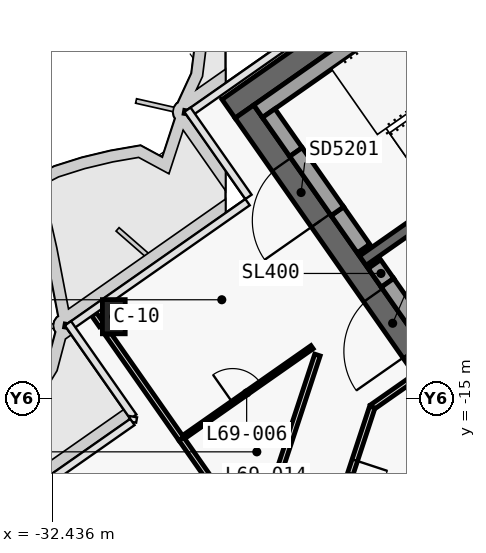
"""IFC4 building model, lengths in metres.
Left out: names, types, materials, properties, quantities, classifications, styles, units other than length and angle.
Written with IfcOpenShell. Run it as: python <this file> out.ifc"""

import sys

from ifc_helpers import new_model, si_unit, direction, frame, frame_2d, origin, origin_2d, place, context, subcontext, project, spatial, polyline, rectangle, outline, extrude, clip, halfspace, element, fill, save


model = new_model("IFC4")
c1 = context("Model", 3, precision=1e-05, world=origin(), true_north=direction((0.0, 1.0)))
c2 = subcontext(c1, "Body", "Model", "MODEL_VIEW")
j1 = project(units=[si_unit("LENGTHUNIT", "METRE"), si_unit("PLANEANGLEUNIT", "RADIAN")], contexts=[c1])
p1 = place(None, origin())
s1 = spatial("IfcSite", under=j1, at=p1, CompositionType="ELEMENT")
p2 = place(p1, origin())
s2 = spatial("IfcBuilding", under=s1, at=p2, CompositionType="ELEMENT")
p3 = place(p2, frame((0.0, 0.0, 291.7)))
s3 = spatial("IfcBuildingStorey", under=s2, at=p3, CompositionType="ELEMENT", Elevation=291.7)
p4 = place(p3, frame((-0.028, 12.066, 0.0), z_axis=(0.0, 0.0, 1.0), x_axis=(-0.819151382952, -0.573577380837, 0.0)))
e1 = element("IfcWall", 1, at=p4, inside=s3, PredefinedType="SHEAR", context=c2, shape_type="SweptSolid", body=[
    extrude(outline(polyline([(33.898, 0.3), (0.42, 0.3), (0.0, -0.3), (33.898, -0.3), (33.898, 0.3)])), origin(), (0.0, 0.0, 1.0), 3.9),
])
p5 = place(p3, frame((-21.642, -15.642, 0.0), z_axis=(0.0, 0.0, 1.0), x_axis=(-0.573586866468, 0.819144740944, 0.0)))
e2 = element("IfcWall", 2, at=p5, inside=s3, PredefinedType="SHEAR", context=c2, shape_type="SweptSolid", body=[
    extrude(outline(polyline([(0.0, 0.3), (0.0, -0.3), (10.0, -0.3), (10.0, 0.3), (0.0, 0.3)])), origin(), (0.0, 0.0, 1.0), 3.9),
])
p6 = place(p5, frame((6.5, 0.0, 0.0)))
e3 = element("IfcOpeningElement", 3, at=p6, cuts=e2, PredefinedType="OPENING", context=c2, shape_type="SweptSolid", body=[
    extrude(rectangle(XDim=1.8, YDim=2.1, at=frame_2d((0.9, 1.05))), frame((0.0, 0.31, 0.0), z_axis=(0.0, -1.0, 0.0), x_axis=(1.0, 0.0, 0.0)), (0.0, 0.0, 1.0), 0.62),
])
p7 = place(p5, frame((2.3, 0.0, 0.0)))
e4 = element("IfcOpeningElement", 4, at=p7, cuts=e2, PredefinedType="OPENING", context=c2, shape_type="SweptSolid", body=[
    extrude(rectangle(XDim=1.8, YDim=2.1, at=frame_2d((0.9, 1.05))), frame((0.0, 0.31, 0.0), z_axis=(0.0, -1.0, 0.0), x_axis=(1.0, 0.0, 0.0)), (0.0, 0.0, 1.0), 0.62),
])
p8 = place(p3, frame((-2.638, 3.768, 0.0), z_axis=(0.0, 0.0, 1.0), x_axis=(-0.819155014212, -0.573572194837, 0.0)))
e5 = element("IfcWall", 5, at=p8, inside=s3, PredefinedType="SHEAR", context=c2, shape_type="SweptSolid", body=[
    extrude(outline(polyline([(26.4, 0.15), (0.0, 0.15), (0.0, -0.15), (26.4, -0.15), (26.4, 0.15)])), origin(), (0.0, 0.0, 1.0), 3.9),
])
p9 = place(p8, frame((1.169, 0.0, 0.0)))
e6 = element("IfcOpeningElement", 6, at=p9, cuts=e5, PredefinedType="OPENING", context=c2, shape_type="SweptSolid", body=[
    extrude(rectangle(XDim=1.1, YDim=2.1, at=frame_2d((0.55, 1.05))), frame((0.0, 0.16, 0.0), z_axis=(0.0, -1.0, 0.0), x_axis=(1.0, 0.0, 0.0)), (0.0, 0.0, 1.0), 0.32),
])
p10 = place(p8, frame((3.206, 0.0, 0.0)))
e7 = element("IfcOpeningElement", 7, at=p10, cuts=e5, PredefinedType="OPENING", context=c2, shape_type="SweptSolid", body=[
    extrude(rectangle(XDim=1.1, YDim=2.1, at=frame_2d((0.55, 1.05))), frame((0.0, 0.16, 0.0), z_axis=(0.0, -1.0, 0.0), x_axis=(1.0, 0.0, 0.0)), (0.0, 0.0, 1.0), 0.32),
])
p11 = place(p8, frame((5.244, 0.0, 0.0)))
e8 = element("IfcOpeningElement", 8, at=p11, cuts=e5, PredefinedType="OPENING", context=c2, shape_type="SweptSolid", body=[
    extrude(rectangle(XDim=1.1, YDim=2.1, at=frame_2d((0.55, 1.05))), frame((0.0, 0.16, 0.0), z_axis=(0.0, -1.0, 0.0), x_axis=(1.0, 0.0, 0.0)), (0.0, 0.0, 1.0), 0.32),
])
p12 = place(p8, frame((7.281, 0.0, 0.0)))
e9 = element("IfcOpeningElement", 9, at=p12, cuts=e5, PredefinedType="OPENING", context=c2, shape_type="SweptSolid", body=[
    extrude(rectangle(XDim=1.1, YDim=2.1, at=frame_2d((0.55, 1.05))), frame((0.0, 0.16, 0.0), z_axis=(0.0, -1.0, 0.0), x_axis=(1.0, 0.0, 0.0)), (0.0, 0.0, 1.0), 0.32),
])
p13 = place(p8, frame((9.688, 0.0, 0.0)))
e10 = element("IfcOpeningElement", 10, at=p13, cuts=e5, PredefinedType="OPENING", context=c2, shape_type="SweptSolid", body=[
    extrude(rectangle(XDim=1.1, YDim=2.1, at=frame_2d((0.55, 1.05))), frame((0.0, 0.16, 0.0), z_axis=(0.0, -1.0, 0.0), x_axis=(1.0, 0.0, 0.0)), (0.0, 0.0, 1.0), 0.32),
])
p14 = place(p8, frame((11.863, 0.0, 0.0)))
e11 = element("IfcOpeningElement", 11, at=p14, cuts=e5, PredefinedType="OPENING", context=c2, shape_type="SweptSolid", body=[
    extrude(rectangle(XDim=1.1, YDim=2.1, at=frame_2d((0.55, 1.05))), frame((0.0, 0.16, 0.0), z_axis=(0.0, -1.0, 0.0), x_axis=(1.0, 0.0, 0.0)), (0.0, 0.0, 1.0), 0.32),
])
p15 = place(p8, frame((15.175, 0.0, 0.0)))
e12 = element("IfcOpeningElement", 12, at=p15, cuts=e5, PredefinedType="OPENING", context=c2, shape_type="SweptSolid", body=[
    extrude(rectangle(XDim=1.0, YDim=2.1, at=frame_2d((0.5, 1.05))), frame((0.0, 0.16, 0.0), z_axis=(0.0, -1.0, 0.0), x_axis=(1.0, 0.0, 0.0)), (0.0, 0.0, 1.0), 0.32),
])
p16 = place(p3, frame((-30.969, -12.957, 0.0), z_axis=(0.477708473805, 0.334513449123, 0.812339440388), x_axis=(-0.665417487414, -0.465955935529, 0.583184905146)))
e13 = element("IfcColumn", 13, at=p16, inside=s3, PredefinedType="COLUMN", context=c2, shape_type="Clipping", body=[
    clip(clip(extrude(rectangle(XDim=0.9, YDim=0.6, at=origin_2d()), origin(), (0.0, 0.0, 1.0), 4.801), halfspace(frame((0.0, 0.0, 0.323), z_axis=(0.0, 0.0, 1.0), x_axis=(1.0, 0.0, 0.0)), True)), halfspace(frame((0.0, 0.0, 4.478), z_axis=(0.0, 0.0, 1.0), x_axis=(1.0, 0.0, 0.0)), False)),
])
p17 = place(p3, frame((-31.817, -17.761, 0.0), z_axis=(0.477747821975, 0.334512857575, 0.812316543421), x_axis=(-0.573565197047, 0.819159914019, 0.0)))
e14 = element("IfcColumn", 14, at=p17, inside=s3, PredefinedType="COLUMN", context=c2, shape_type="Clipping", body=[
    clip(clip(extrude(rectangle(XDim=0.9, YDim=0.6, at=origin_2d()), origin(), (0.0, 0.0, 1.0), 4.801), halfspace(frame((0.0, 0.0, 0.215), z_axis=(0.0, 0.0, 1.0), x_axis=(1.0, 0.0, 0.0)), True)), halfspace(frame((0.0, 0.0, 4.586), z_axis=(0.0, 0.0, 1.0), x_axis=(1.0, 0.0, 0.0)), False)),
])
p18 = place(p3, frame((-20.259, -2.71, 0.0), z_axis=(0.0, 0.0, 1.0), x_axis=(-0.81914849389, -0.573581506813, 0.0)))
e15 = element("IfcWall", 15, at=p18, inside=s3, PredefinedType="SOLIDWALL", context=c2, shape_type="SweptSolid", body=[
    extrude(rectangle(XDim=8.25, YDim=0.4, at=frame_2d((4.125, 0.0))), origin(), (0.0, 0.0, 1.0), 3.62),
])
p19 = place(p3, frame((-24.244, -11.055, 0.0), z_axis=(0.0, 0.0, 1.0), x_axis=(-0.573571582932, 0.819155442668, 0.0)))
e16 = element("IfcWall", 16, at=p19, inside=s3, PredefinedType="SOLIDWALL", context=c2, shape_type="SweptSolid", body=[
    extrude(rectangle(XDim=1.2, YDim=0.4, at=frame_2d((0.6, 0.0))), origin(), (0.0, 0.0, 1.0), 3.62),
])
p20 = place(p3, frame((-26.022, -8.515, 0.0), z_axis=(0.0, 0.0, 1.0), x_axis=(-0.573619628835, 0.819121798889, 0.0)))
e17 = element("IfcWall", 17, at=p20, inside=s3, PredefinedType="SOLIDWALL", context=c2, shape_type="SweptSolid", body=[
    extrude(rectangle(XDim=1.25, YDim=0.4, at=frame_2d((0.625, 0.0))), origin(), (0.0, 0.0, 1.0), 3.62),
])
p21 = place(p3, frame((-24.932, -10.072, 2.15), z_axis=(0.0, 0.0, 1.0), x_axis=(-0.573591692345, 0.819141361715, 0.0)))
e18 = element("IfcWall", 18, at=p21, inside=s3, PredefinedType="SOLIDWALL", context=c2, shape_type="SweptSolid", body=[
    extrude(rectangle(XDim=1.9, YDim=0.4, at=frame_2d((0.95, 0.0))), origin(), (0.0, 0.0, 1.0), 1.47),
])
p22 = place(p3, frame((-23.613, -11.956, 0.0), z_axis=(0.0, 0.0, 1.0), x_axis=(-0.573435029941, 0.819251039936, 0.0)))
e19 = element("IfcWall", 19, at=p22, inside=s3, PredefinedType="SOLIDWALL", context=c2, shape_type="SweptSolid", body=[
    extrude(rectangle(XDim=0.6, YDim=0.4, at=frame_2d((0.3, 0.0))), origin(), (0.0, 0.0, 1.0), 3.62),
])
p23 = place(p3, frame((-22.523, -13.512, 2.15), z_axis=(0.0, 0.0, 1.0), x_axis=(-0.573591692345, 0.819141361715, 0.0)))
e20 = element("IfcWall", 20, at=p23, inside=s3, PredefinedType="SOLIDWALL", context=c2, shape_type="SweptSolid", body=[
    extrude(rectangle(XDim=1.9, YDim=0.4, at=frame_2d((0.95, 0.0))), origin(), (0.0, 0.0, 1.0), 1.47),
])
p24 = place(p3, frame((-25.213, -18.875, 0.0), z_axis=(0.0, 0.0, 1.0), x_axis=(0.819134577063, 0.573601381327, 0.0)))
e21 = element("IfcWall", 21, at=p24, inside=s3, PredefinedType="PARTITIONING", context=c2, shape_type="SweptSolid", body=[
    extrude(rectangle(XDim=4.36, YDim=0.15, at=frame_2d((2.18, 0.0))), origin(), (0.0, 0.0, 1.0), 3.05),
])
p25 = place(p3, frame((-27.097, -18.838, 0.0), z_axis=(0.0, 0.0, 1.0), x_axis=(0.312790582107, 0.949822115843, 0.0)))
e22 = element("IfcWall", 22, at=p25, inside=s3, PredefinedType="PARTITIONING", context=c2, shape_type="SweptSolid", body=[
    extrude(rectangle(XDim=5.245, YDim=0.15, at=frame_2d((2.623, 0.0))), origin(), (0.0, 0.0, 1.0), 3.05),
])
p26 = place(p3, frame((-22.961, -14.49, 0.0), z_axis=(0.0, 0.0, 1.0), x_axis=(-0.819133624144, -0.573602742145, 0.0)))
e23 = element("IfcWall", 23, at=p26, inside=s3, PredefinedType="PARTITIONING", context=c2, shape_type="SweptSolid", body=[
    extrude(rectangle(XDim=1.284, YDim=0.15, at=frame_2d((0.642, 0.0))), origin(), (0.0, 0.0, 1.0), 3.62),
])
p27 = place(p3, frame((-24.013, -15.227, 0.0), z_axis=(0.0, 0.0, 1.0), x_axis=(-0.312793296718, -0.949821221877, 0.0)))
e24 = element("IfcWall", 24, at=p27, inside=s3, PredefinedType="PARTITIONING", context=c2, shape_type="SweptSolid", body=[
    extrude(rectangle(XDim=3.841, YDim=0.15, at=frame_2d((1.92, 0.0))), origin(), (0.0, 0.0, 1.0), 3.05),
])
p28 = place(p27, frame((1.47, 0.0, 0.0)))
e25 = element("IfcOpeningElement", 25, at=p28, cuts=e24, PredefinedType="OPENING", context=c2, shape_type="SweptSolid", body=[
    extrude(rectangle(XDim=0.9, YDim=2.1, at=frame_2d((0.45, 1.05))), frame((0.0, 0.085, 0.0), z_axis=(0.0, -1.0, 0.0), x_axis=(1.0, 0.0, 0.0)), (0.0, 0.0, 1.0), 0.17),
])
p29 = place(p3, frame((-29.04, -16.06, 0.0), z_axis=(0.0, 0.0, 1.0), x_axis=(0.819139100631, 0.573594921367, 0.0)))
e26 = element("IfcWall", 26, at=p29, inside=s3, PredefinedType="PARTITIONING", context=c2, shape_type="SweptSolid", body=[
    extrude(rectangle(XDim=4.202, YDim=0.1, at=frame_2d((2.101, 0.0))), origin(), (0.0, 0.0, 1.0), 3.05),
])
p30 = place(p29, frame((1.651, 0.0, 0.0)))
e27 = element("IfcOpeningElement", 27, at=p30, cuts=e26, PredefinedType="OPENING", context=c2, shape_type="SweptSolid", body=[
    extrude(rectangle(XDim=0.9, YDim=2.1, at=frame_2d((0.45, 1.05))), frame((0.0, 0.06, 0.0), z_axis=(0.0, -1.0, 0.0), x_axis=(1.0, 0.0, 0.0)), (0.0, 0.0, 1.0), 0.12),
])
p31 = place(p3, frame((-29.04, -16.06, 0.0), z_axis=(0.0, 0.0, 1.0), x_axis=(-0.573574925941, 0.819153101887, 0.0)))
e28 = element("IfcWall", 28, at=p31, inside=s3, PredefinedType="PARTITIONING", context=c2, shape_type="SweptSolid", body=[
    extrude(rectangle(XDim=3.347, YDim=0.15, at=frame_2d((1.674, 0.0))), origin(), (0.0, 0.0, 1.0), 3.0),
])
p32 = place(p3, frame((-31.135, -13.069, 0.0), z_axis=(0.0, 0.0, 1.0), x_axis=(-0.573084278088, 0.819496436971, 0.0)))
e29 = element("IfcWall", 29, at=p32, inside=s3, PredefinedType="PARTITIONING", context=c2, shape_type="SweptSolid", body=[
    extrude(rectangle(XDim=0.347, YDim=0.15, at=frame_2d((0.173, 0.0))), origin(), (0.0, 0.0, 1.0), 3.62),
])
p33 = place(p3, frame((-27.096, -18.836, 0.0), z_axis=(0.0, 0.0, 1.0), x_axis=(-0.573563907824, 0.819160816715, 0.0)))
e30 = element("IfcWall", 30, at=p33, inside=s3, PredefinedType="PARTITIONING", context=c2, shape_type="SweptSolid", body=[
    extrude(rectangle(XDim=3.388, YDim=0.15, at=frame_2d((1.694, 0.0))), origin(), (0.0, 0.0, 1.0), 3.62),
])
p34 = place(p33, frame((1.244, 0.0, 0.0)))
e31 = element("IfcOpeningElement", 31, at=p34, cuts=e30, PredefinedType="OPENING", context=c2, shape_type="SweptSolid", body=[
    extrude(rectangle(XDim=0.9, YDim=2.1, at=frame_2d((0.45, 1.05))), frame((0.0, 0.085, 0.0), z_axis=(0.0, -1.0, 0.0), x_axis=(1.0, 0.0, 0.0)), (0.0, 0.0, 1.0), 0.17),
])
p35 = place(p6, origin())
e32 = element("IfcDoor", 32, at=p35, inside=s3, OperationType="DOUBLE_DOOR_SINGLE_SWING", PredefinedType="DOOR", context=c2, shape_type="SweptSolid", body=[
    extrude(rectangle(XDim=1.8, YDim=2.1, at=frame_2d((0.9, 1.05))), frame((0.0, 0.025, 0.0), z_axis=(0.0, -1.0, 0.0), x_axis=(1.0, 0.0, 0.0)), (0.0, 0.0, 1.0), 0.05),
])
fill(e3, e32)
p36 = place(p7, origin())
e33 = element("IfcDoor", 33, at=p36, inside=s3, OperationType="DOUBLE_DOOR_SINGLE_SWING", PredefinedType="DOOR", context=c2, shape_type="SweptSolid", body=[
    extrude(rectangle(XDim=1.8, YDim=2.1, at=frame_2d((0.9, 1.05))), frame((0.0, 0.025, 0.0), z_axis=(0.0, -1.0, 0.0), x_axis=(1.0, 0.0, 0.0)), (0.0, 0.0, 1.0), 0.05),
])
fill(e4, e33)
p37 = place(p30, origin())
e34 = element("IfcDoor", 34, at=p37, inside=s3, OperationType="SINGLE_SWING_LEFT", PredefinedType="DOOR", context=c2, shape_type="SweptSolid", body=[
    extrude(rectangle(XDim=0.9, YDim=2.1, at=frame_2d((0.45, 1.05))), frame((0.0, 0.025, 0.0), z_axis=(0.0, -1.0, 0.0), x_axis=(1.0, 0.0, 0.0)), (0.0, 0.0, 1.0), 0.05),
])
fill(e27, e34)
p38 = place(p28, origin())
e35 = element("IfcDoor", 35, at=p38, inside=s3, OperationType="SINGLE_SWING_LEFT", PredefinedType="DOOR", context=c2, shape_type="SweptSolid", body=[
    extrude(rectangle(XDim=0.9, YDim=2.1, at=frame_2d((0.45, 1.05))), frame((0.0, 0.025, 0.0), z_axis=(0.0, -1.0, 0.0), x_axis=(1.0, 0.0, 0.0)), (0.0, 0.0, 1.0), 0.05),
])
fill(e25, e35)
save(model, sys.argv[1])
